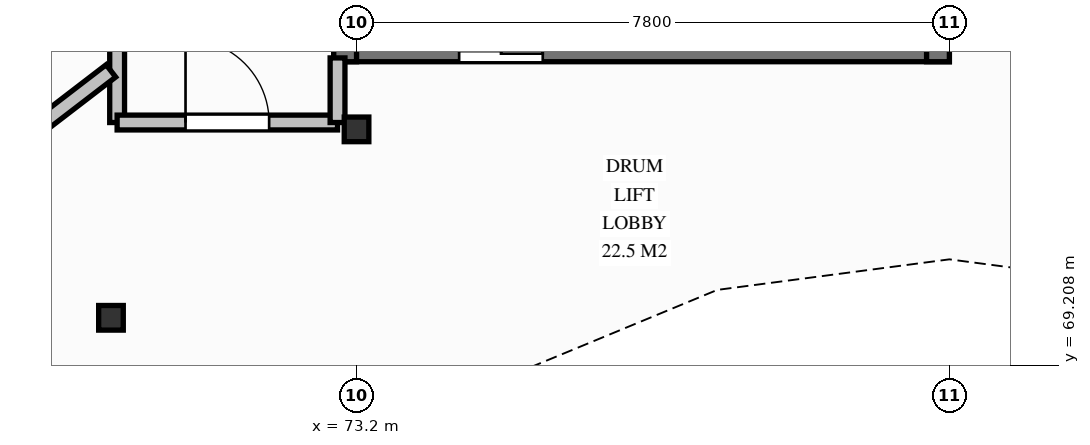
"""IFC4 building model, lengths in metres.
Left out: names, types, materials, properties, quantities, classifications, styles, units other than length and angle.
Written with IfcOpenShell. Run it as: python <this file> out.ifc"""

import sys

from ifc_helpers import new_model, si_unit, direction, frame, frame_2d, origin, origin_2d, place, context, subcontext, project, spatial, rectangle, hollow_circle, extrude, element, fill, save


model = new_model("IFC4")
c1 = context("Model", 3, precision=1e-05, world=origin(), true_north=direction((0.0, 1.0)))
c2 = subcontext(c1, "Body", "Model", "MODEL_VIEW")
j1 = project(units=[si_unit("LENGTHUNIT", "METRE"), si_unit("PLANEANGLEUNIT", "RADIAN")], contexts=[c1])
p1 = place(None, origin())
s1 = spatial("IfcSite", under=j1, at=p1, CompositionType="ELEMENT")
p2 = place(p1, origin())
s2 = spatial("IfcBuilding", under=s1, at=p2, CompositionType="ELEMENT")
p3 = place(p2, frame((0.0, 0.0, -4.5)))
s3 = spatial("IfcBuildingStorey", under=s2, at=p3, CompositionType="ELEMENT", Elevation=-4.5)
p4 = place(p3, frame((72.9, 73.35, 0.0), z_axis=(0.0, 0.0, 1.0), x_axis=(1.0, 0.0, 0.0)))
e1 = element("IfcWall", 1, at=p4, inside=s3, PredefinedType="SHEAR", context=c2, shape_type="SweptSolid", body=[
    extrude(rectangle(XDim=8.1, YDim=0.3, at=frame_2d((4.05, 0.0))), origin(), (0.0, 0.0, 1.0), 4.5),
])
p5 = place(p4, frame((1.65, 0.0, 0.0)))
e2 = element("IfcOpeningElement", 2, at=p5, cuts=e1, PredefinedType="OPENING", context=c2, shape_type="SweptSolid", body=[
    extrude(rectangle(XDim=1.1, YDim=2.1, at=frame_2d((0.55, 1.05))), frame((0.0, 0.16, 0.0), z_axis=(0.0, -1.0, 0.0), x_axis=(1.0, 0.0, 0.0)), (0.0, 0.0, 1.0), 0.32),
])
p6 = place(p3, frame((73.05, 73.2, 0.0), z_axis=(0.0, 0.0, 1.0), x_axis=(0.0, 1.0, 0.0)))
e3 = element("IfcWall", 3, at=p6, inside=s3, PredefinedType="SHEAR", context=c2, shape_type="SweptSolid", body=[
    extrude(rectangle(XDim=7.2, YDim=0.3, at=frame_2d((3.6, 0.0))), origin(), (0.0, 0.0, 1.0), 4.5),
])
p7 = place(p6, frame((4.2, 0.0, 0.0)))
e4 = element("IfcOpeningElement", 4, at=p7, cuts=e3, PredefinedType="OPENING", context=c2, shape_type="SweptSolid", body=[
    extrude(rectangle(XDim=1.1, YDim=2.15, at=frame_2d((0.55, 1.075))), frame((0.0, 0.16, 0.0), z_axis=(0.0, -1.0, 0.0), x_axis=(1.0, 0.0, 0.0)), (0.0, 0.0, 1.0), 0.32),
])
p8 = place(p3, frame((80.85, 73.2, 0.0), z_axis=(0.0, 0.0, 1.0), x_axis=(0.0, 1.0, 0.0)))
e5 = element("IfcWall", 5, at=p8, inside=s3, PredefinedType="SHEAR", context=c2, shape_type="SweptSolid", body=[
    extrude(rectangle(XDim=7.2, YDim=0.3, at=frame_2d((3.6, 0.0))), origin(), (0.0, 0.0, 1.0), 4.5),
])
for number, where, z_axis, x_axis in (
    (6, (73.2, 72.31, 0.0), (0.0, 0.0, 1.0), (1.0, 0.0, 0.0)),
    (7, (69.969, 69.831, 0.0), (0.0, 0.0, 1.0), (1.0, 0.0, 0.0)),
):
    element("IfcColumn", number, at=place(p3, frame(where, z_axis=z_axis, x_axis=x_axis)), inside=s3, PredefinedType="COLUMN", context=c2, shape_type="SweptSolid", body=[
        extrude(hollow_circle(Radius=0.162, WallThickness=0.016, at=origin_2d()), origin(), (0.0, 0.0, 1.0), 4.5),
    ])
p9 = place(p3, frame((70.05, 72.4, 0.0), z_axis=(0.0, 0.0, 1.0), x_axis=(0.0, 1.0, 0.0)))
e8 = element("IfcWall", 8, at=p9, inside=s3, PredefinedType="PARTITIONING", context=c2, shape_type="SweptSolid", body=[
    extrude(rectangle(XDim=7.8, YDim=0.195, at=frame_2d((3.9, 0.0))), origin(), (0.0, 0.0, 1.0), 3.413),
])
p10 = place(p3, frame((70.05, 72.4, 0.0), z_axis=(0.0, 0.0, 1.0), x_axis=(1.0, 0.0, 0.0)))
e9 = element("IfcWall", 9, at=p10, inside=s3, PredefinedType="PARTITIONING", context=c2, shape_type="SweptSolid", body=[
    extrude(rectangle(XDim=2.9, YDim=0.195, at=frame_2d((1.45, 0.0))), origin(), (0.0, 0.0, 1.0), 3.513),
])
p11 = place(p10, frame((0.9, 0.0, 0.0)))
e10 = element("IfcOpeningElement", 10, at=p11, cuts=e9, PredefinedType="OPENING", context=c2, shape_type="SweptSolid", body=[
    extrude(rectangle(XDim=1.1, YDim=2.15, at=frame_2d((0.55, 1.075))), frame((0.0, 0.107, 0.0), z_axis=(0.0, -1.0, 0.0), x_axis=(1.0, 0.0, 0.0)), (0.0, 0.0, 1.0), 0.215),
])
p12 = place(p3, frame((72.95, 72.4, 0.0), z_axis=(0.0, 0.0, 1.0), x_axis=(0.0, 1.0, 0.0)))
e11 = element("IfcWall", 11, at=p12, inside=s3, PredefinedType="PARTITIONING", context=c2, shape_type="SweptSolid", body=[
    extrude(rectangle(XDim=0.85, YDim=0.195, at=frame_2d((0.425, 0.0))), origin(), (0.0, 0.0, 1.0), 3.513),
])
p13 = place(p3, frame((69.969, 73.079, 0.0), z_axis=(0.0, 0.0, 1.0), x_axis=(-0.7933756116, -0.608732403374, 0.0)))
e12 = element("IfcWall", 12, at=p13, inside=s3, PredefinedType="PARTITIONING", context=c2, shape_type="SweptSolid", body=[
    extrude(rectangle(XDim=2.317, YDim=0.205, at=frame_2d((1.158, 0.0))), origin(), (0.0, 0.0, 1.0), 3.513),
])
p14 = place(p11, origin())
e13 = element("IfcDoor", 13, at=p14, inside=s3, OperationType="SINGLE_SWING_LEFT", PredefinedType="DOOR", context=c2, shape_type="SweptSolid", body=[
    extrude(rectangle(XDim=1.1, YDim=2.15, at=frame_2d((0.55, 1.075))), frame((0.0, 0.025, 0.0), z_axis=(0.0, -1.0, 0.0), x_axis=(1.0, 0.0, 0.0)), (0.0, 0.0, 1.0), 0.05),
])
fill(e10, e13)
save(model, sys.argv[1])
